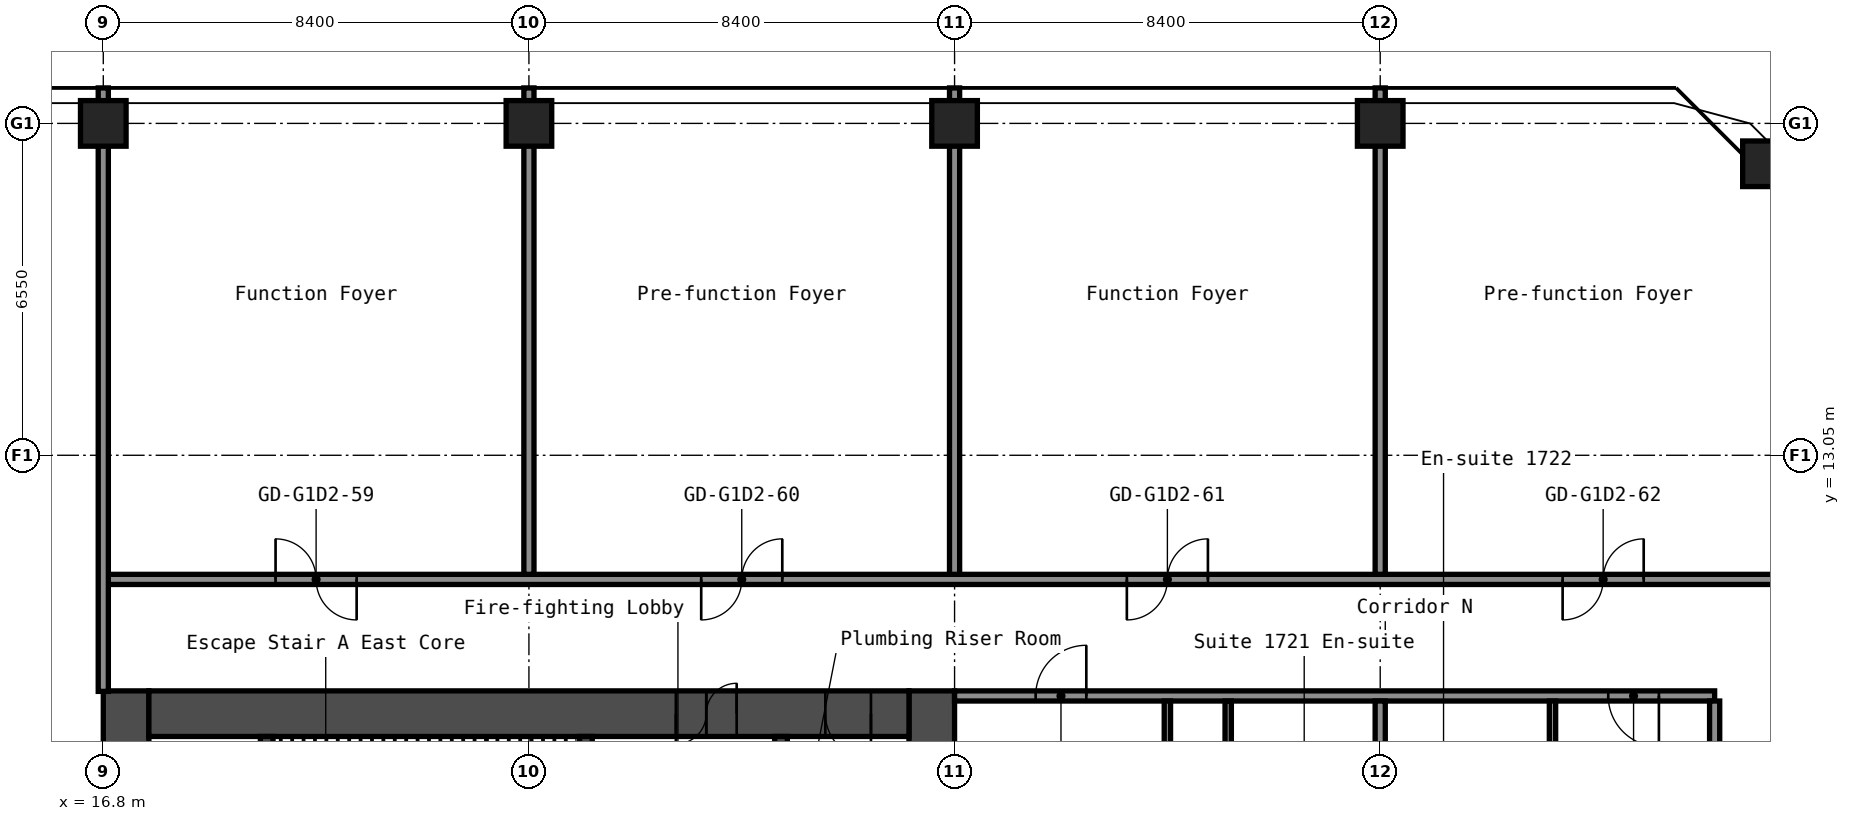
"""IFC4 building model, lengths in metres.
Left out: names, types, materials, properties, quantities, classifications, styles, units other than length and angle.
Written with IfcOpenShell. Run it as: python <this file> out.ifc"""

import sys

from ifc_helpers import new_model, si_unit, direction, frame, frame_2d, origin, origin_2d, place, context, subcontext, project, spatial, rectangle, hollow_rectangle, extrude, element, fill, save


model = new_model("IFC4")
c1 = context("Model", 3, precision=1e-05, world=origin(), true_north=direction((0.0, 1.0)))
c2 = subcontext(c1, "Body", "Model", "MODEL_VIEW")
j1 = project(units=[si_unit("LENGTHUNIT", "METRE"), si_unit("PLANEANGLEUNIT", "RADIAN")], contexts=[c1])
p1 = place(None, origin())
s1 = spatial("IfcSite", under=j1, at=p1, CompositionType="ELEMENT")
p2 = place(p1, origin())
s2 = spatial("IfcBuilding", under=s1, at=p2, CompositionType="ELEMENT")
p3 = place(p2, frame((0.0, 0.0, 61.4)))
s3 = spatial("IfcBuildingStorey", under=s2, at=p3, CompositionType="ELEMENT", Elevation=61.4)
for number, where, z_axis, x_axis in (
    (1, (16.8, 19.6, 0.0), (0.0, 0.0, 1.0), (1.0, 0.0, 0.0)),
    (2, (25.2, 19.6, 0.0), (0.0, 0.0, 1.0), (1.0, 0.0, 0.0)),
    (3, (33.6, 19.6, 0.0), (0.0, 0.0, 1.0), (1.0, 0.0, 0.0)),
    (4, (42.0, 19.6, 0.0), (0.0, 0.0, 1.0), (1.0, 0.0, 0.0)),
    (5, (49.603, 18.803, 0.0), (0.0, 0.0, 1.0), (1.0, 0.0, 0.0)),
):
    element("IfcColumn", number, at=place(p3, frame(where, z_axis=z_axis, x_axis=x_axis)), inside=s3, PredefinedType="COLUMN", context=c2, shape_type="SweptSolid", body=[
        extrude(hollow_rectangle(XDim=0.9, YDim=0.9, WallThickness=0.036, at=origin_2d()), origin(), (0.0, 0.0, 1.0), 2.9),
    ])
p4 = place(p3, frame((17.25, -8.4, 0.0), z_axis=(0.0, 0.0, 1.0), x_axis=(0.0, 1.0, 0.0)))
e6 = element("IfcWall", 6, at=p4, inside=s3, PredefinedType="SHEAR", context=c2, shape_type="SweptSolid", body=[
    extrude(rectangle(XDim=16.8, YDim=0.9, at=frame_2d((8.4, 0.0))), origin(), (0.0, 0.0, 1.0), 2.9),
])
p5 = place(p4, frame((12.75, 0.0, 0.0)))
e7 = element("IfcOpeningElement", 7, at=p5, cuts=e6, PredefinedType="OPENING", context=c2, shape_type="SweptSolid", body=[
    extrude(rectangle(XDim=1.2, YDim=2.1, at=frame_2d((0.6, 1.05))), frame((0.0, 0.46, 0.0), z_axis=(0.0, -1.0, 0.0), x_axis=(1.0, 0.0, 0.0)), (0.0, 0.0, 1.0), 0.92),
])
p6 = place(p4, frame((2.85, 0.0, 0.0)))
e8 = element("IfcOpeningElement", 8, at=p6, cuts=e6, PredefinedType="OPENING", context=c2, shape_type="SweptSolid", body=[
    extrude(rectangle(XDim=1.2, YDim=2.1, at=frame_2d((0.6, 1.05))), frame((0.0, 0.46, 0.0), z_axis=(0.0, -1.0, 0.0), x_axis=(1.0, 0.0, 0.0)), (0.0, 0.0, 1.0), 0.92),
])
p7 = place(p3, frame((33.15, -8.4, 0.0), z_axis=(0.0, 0.0, 1.0), x_axis=(0.0, 1.0, 0.0)))
e9 = element("IfcWall", 9, at=p7, inside=s3, PredefinedType="SHEAR", context=c2, shape_type="SweptSolid", body=[
    extrude(rectangle(XDim=16.8, YDim=0.9, at=frame_2d((8.4, 0.0))), origin(), (0.0, 0.0, 1.0), 2.9),
])
p8 = place(p3, frame((17.7, 7.95, 0.0), z_axis=(0.0, 0.0, 1.0), x_axis=(1.0, 0.0, 0.0)))
e10 = element("IfcWall", 10, at=p8, inside=s3, PredefinedType="SHEAR", context=c2, shape_type="SweptSolid", body=[
    extrude(rectangle(XDim=15.0, YDim=0.9, at=frame_2d((7.5, 0.0))), origin(), (0.0, 0.0, 1.0), 2.9),
])
p9 = place(p8, frame((10.4, 0.0, 0.0)))
e11 = element("IfcOpeningElement", 11, at=p9, cuts=e10, PredefinedType="OPENING", context=c2, shape_type="SweptSolid", body=[
    extrude(rectangle(XDim=1.2, YDim=2.1, at=frame_2d((0.6, 1.05))), frame((0.0, 0.46, 0.0), z_axis=(0.0, -1.0, 0.0), x_axis=(1.0, 0.0, 0.0)), (0.0, 0.0, 1.0), 0.92),
])
p10 = place(p8, frame((13.35, 0.0, 0.0)))
e12 = element("IfcOpeningElement", 12, at=p10, cuts=e10, PredefinedType="OPENING", context=c2, shape_type="SweptSolid", body=[
    extrude(rectangle(XDim=0.9, YDim=2.1, at=frame_2d((0.45, 1.05))), frame((0.0, 0.46, 0.0), z_axis=(0.0, -1.0, 0.0), x_axis=(1.0, 0.0, 0.0)), (0.0, 0.0, 1.0), 0.92),
])
p11 = place(p3, frame((20.025, 1.2, 0.0), z_axis=(0.0, 0.0, 1.0), x_axis=(0.0, 1.0, 0.0)))
e13 = element("IfcWall", 13, at=p11, inside=s3, PredefinedType="SHEAR", context=c2, shape_type="SweptSolid", body=[
    extrude(rectangle(XDim=6.3, YDim=0.25, at=frame_2d((3.15, 0.0))), origin(), (0.0, 0.0, 1.0), 2.9),
])
p12 = place(p3, frame((26.325, 3.75, 0.0), z_axis=(0.0, 0.0, 1.0), x_axis=(0.0, 1.0, 0.0)))
e14 = element("IfcWall", 14, at=p12, inside=s3, PredefinedType="SHEAR", context=c2, shape_type="SweptSolid", body=[
    extrude(rectangle(XDim=3.75, YDim=0.25, at=frame_2d((1.875, 0.0))), origin(), (0.0, 0.0, 1.0), 2.9),
])
p13 = place(p12, frame((1.25, 0.0, 0.0)))
e15 = element("IfcOpeningElement", 15, at=p13, cuts=e14, PredefinedType="OPENING", context=c2, shape_type="SweptSolid", body=[
    extrude(rectangle(XDim=1.2, YDim=2.1, at=frame_2d((0.6, 1.05))), frame((0.0, 0.135, 0.0), z_axis=(0.0, -1.0, 0.0), x_axis=(1.0, 0.0, 0.0)), (0.0, 0.0, 1.0), 0.27),
])
p14 = place(p3, frame((30.175, 1.45, 0.0), z_axis=(0.0, 0.0, 1.0), x_axis=(0.0, 1.0, 0.0)))
e16 = element("IfcWall", 16, at=p14, inside=s3, PredefinedType="SHEAR", context=c2, shape_type="SweptSolid", body=[
    extrude(rectangle(XDim=6.05, YDim=0.25, at=frame_2d((3.025, 0.0))), origin(), (0.0, 0.0, 1.0), 2.9),
])
p15 = place(p14, frame((2.625, 0.0, 0.0)))
e17 = element("IfcOpeningElement", 17, at=p15, cuts=e16, PredefinedType="OPENING", context=c2, shape_type="SweptSolid", body=[
    extrude(rectangle(XDim=1.1, YDim=2.1, at=frame_2d((0.55, 1.05))), frame((0.0, 0.135, 0.0), z_axis=(0.0, -1.0, 0.0), x_axis=(1.0, 0.0, 0.0)), (0.0, 0.0, 1.0), 0.27),
])
p16 = place(p3, frame((33.6, 8.3, 0.0), z_axis=(0.0, 0.0, 1.0), x_axis=(1.0, 0.0, 0.0)))
e18 = element("IfcWall", 18, at=p16, inside=s3, PredefinedType="PARTITIONING", context=c2, shape_type="SweptSolid", body=[
    extrude(rectangle(XDim=15.0, YDim=0.2, at=frame_2d((7.5, 0.0))), origin(), (0.0, 0.0, 1.0), 2.9),
])
p17 = place(p16, frame((1.6, 0.0, 0.0)))
e19 = element("IfcOpeningElement", 19, at=p17, cuts=e18, PredefinedType="OPENING", context=c2, shape_type="SweptSolid", body=[
    extrude(rectangle(XDim=1.0, YDim=2.1, at=frame_2d((0.5, 1.05))), frame((0.0, 0.11, 0.0), z_axis=(0.0, -1.0, 0.0), x_axis=(1.0, 0.0, 0.0)), (0.0, 0.0, 1.0), 0.22),
])
p18 = place(p16, frame((12.9, 0.0, 0.0)))
e20 = element("IfcOpeningElement", 20, at=p18, cuts=e18, PredefinedType="OPENING", context=c2, shape_type="SweptSolid", body=[
    extrude(rectangle(XDim=1.0, YDim=2.1, at=frame_2d((0.5, 1.05))), frame((0.0, 0.11, 0.0), z_axis=(0.0, -1.0, 0.0), x_axis=(1.0, 0.0, 0.0)), (0.0, 0.0, 1.0), 0.22),
])
p19 = place(p3, frame((16.8, 10.6, 0.0), z_axis=(0.0, 0.0, 1.0), x_axis=(1.0, 0.0, 0.0)))
e21 = element("IfcWall", 21, at=p19, inside=s3, PredefinedType="PARTITIONING", context=c2, shape_type="SweptSolid", body=[
    extrude(rectangle(XDim=34.3, YDim=0.2, at=frame_2d((17.15, 0.0))), origin(), (0.0, 0.0, 1.0), 2.9),
])
p20 = place(p19, frame((3.4, 0.0, 0.0)))
e22 = element("IfcOpeningElement", 22, at=p20, cuts=e21, PredefinedType="OPENING", context=c2, shape_type="SweptSolid", body=[
    extrude(rectangle(XDim=1.6, YDim=2.1, at=frame_2d((0.8, 1.05))), frame((0.0, 0.11, 0.0), z_axis=(0.0, -1.0, 0.0), x_axis=(1.0, 0.0, 0.0)), (0.0, 0.0, 1.0), 0.22),
])
p21 = place(p19, frame((11.8, 0.0, 0.0)))
e23 = element("IfcOpeningElement", 23, at=p21, cuts=e21, PredefinedType="OPENING", context=c2, shape_type="SweptSolid", body=[
    extrude(rectangle(XDim=1.6, YDim=2.1, at=frame_2d((0.8, 1.05))), frame((0.0, 0.11, 0.0), z_axis=(0.0, -1.0, 0.0), x_axis=(1.0, 0.0, 0.0)), (0.0, 0.0, 1.0), 0.22),
])
p22 = place(p19, frame((20.2, 0.0, 0.0)))
e24 = element("IfcOpeningElement", 24, at=p22, cuts=e21, PredefinedType="OPENING", context=c2, shape_type="SweptSolid", body=[
    extrude(rectangle(XDim=1.6, YDim=2.1, at=frame_2d((0.8, 1.05))), frame((0.0, 0.11, 0.0), z_axis=(0.0, -1.0, 0.0), x_axis=(1.0, 0.0, 0.0)), (0.0, 0.0, 1.0), 0.22),
])
p23 = place(p19, frame((28.8, 0.0, 0.0)))
e25 = element("IfcOpeningElement", 25, at=p23, cuts=e21, PredefinedType="OPENING", context=c2, shape_type="SweptSolid", body=[
    extrude(rectangle(XDim=1.6, YDim=2.1, at=frame_2d((0.8, 1.05))), frame((0.0, 0.11, 0.0), z_axis=(0.0, -1.0, 0.0), x_axis=(1.0, 0.0, 0.0)), (0.0, 0.0, 1.0), 0.22),
])
p24 = place(p3, frame((16.8, 8.39, 0.0), z_axis=(0.0, 0.0, 1.0), x_axis=(0.0, 1.0, 0.0)))
e26 = element("IfcWall", 26, at=p24, inside=s3, PredefinedType="PARTITIONING", context=c2, shape_type="SweptSolid", body=[
    extrude(rectangle(XDim=11.91, YDim=0.2, at=frame_2d((5.955, 0.0))), origin(), (0.0, 0.0, 1.0), 2.9),
])
for number, where, z_axis, x_axis in (
    (27, (25.2, 10.7, 0.0), (0.0, 0.0, 1.0), (0.0, 1.0, 0.0)),
    (28, (33.6, 10.7, 0.0), (0.0, 0.0, 1.0), (0.0, 1.0, 0.0)),
):
    element("IfcWall", number, at=place(p3, frame(where, z_axis=z_axis, x_axis=x_axis)), inside=s3, PredefinedType="PARTITIONING", context=c2, shape_type="SweptSolid", body=[
        extrude(rectangle(XDim=9.6, YDim=0.2, at=frame_2d((4.8, 0.0))), origin(), (0.0, 0.0, 1.0), 2.9),
    ])
p25 = place(p3, frame((37.8, -8.2, 0.0), z_axis=(0.0, 0.0, 1.0), x_axis=(0.0, 1.0, 0.0)))
e29 = element("IfcWall", 29, at=p25, inside=s3, PredefinedType="PARTITIONING", context=c2, shape_type="SweptSolid", body=[
    extrude(rectangle(XDim=16.4, YDim=0.125, at=frame_2d((8.2, 0.0))), origin(), (0.0, 0.0, 1.0), 2.9),
])
p26 = place(p25, frame((4.05, 0.0, 0.0)))
e30 = element("IfcOpeningElement", 30, at=p26, cuts=e29, PredefinedType="OPENING", context=c2, shape_type="SweptSolid", body=[
    extrude(rectangle(XDim=0.9, YDim=2.1, at=frame_2d((0.45, 1.05))), frame((0.0, 0.073, 0.0), z_axis=(0.0, -1.0, 0.0), x_axis=(1.0, 0.0, 0.0)), (0.0, 0.0, 1.0), 0.145),
])
p27 = place(p25, frame((11.45, 0.0, 0.0)))
e31 = element("IfcOpeningElement", 31, at=p27, cuts=e29, PredefinedType="OPENING", context=c2, shape_type="SweptSolid", body=[
    extrude(rectangle(XDim=0.9, YDim=2.1, at=frame_2d((0.45, 1.05))), frame((0.0, 0.073, 0.0), z_axis=(0.0, -1.0, 0.0), x_axis=(1.0, 0.0, 0.0)), (0.0, 0.0, 1.0), 0.145),
])
p28 = place(p3, frame((39.0, 5.1, 0.0), z_axis=(0.0, 0.0, 1.0), x_axis=(0.0, 1.0, 0.0)))
e32 = element("IfcWall", 32, at=p28, inside=s3, PredefinedType="PARTITIONING", context=c2, shape_type="SweptSolid", body=[
    extrude(rectangle(XDim=3.1, YDim=0.125, at=frame_2d((1.55, 0.0))), origin(), (0.0, 0.0, 1.0), 2.9),
])
p29 = place(p3, frame((42.0, -8.2, 0.0), z_axis=(0.0, 0.0, 1.0), x_axis=(0.0, 1.0, 0.0)))
e33 = element("IfcWall", 33, at=p29, inside=s3, PredefinedType="PARTITIONING", context=c2, shape_type="SweptSolid", body=[
    extrude(rectangle(XDim=16.4, YDim=0.2, at=frame_2d((8.2, 0.0))), origin(), (0.0, 0.0, 1.0), 2.9),
])
p30 = place(p3, frame((42.0, 10.7, 0.0), z_axis=(0.0, 0.0, 1.0), x_axis=(0.0, 1.0, 0.0)))
e34 = element("IfcWall", 34, at=p30, inside=s3, PredefinedType="PARTITIONING", context=c2, shape_type="SweptSolid", body=[
    extrude(rectangle(XDim=9.6, YDim=0.2, at=frame_2d((4.8, 0.0))), origin(), (0.0, 0.0, 1.0), 2.9),
])
p31 = place(p3, frame((45.4, 4.9, 0.0), z_axis=(0.0, 0.0, 1.0), x_axis=(0.0, 1.0, 0.0)))
e35 = element("IfcWall", 35, at=p31, inside=s3, PredefinedType="PARTITIONING", context=c2, shape_type="SweptSolid", body=[
    extrude(rectangle(XDim=3.3, YDim=0.125, at=frame_2d((1.65, 0.0))), origin(), (0.0, 0.0, 1.0), 2.9),
])
p32 = place(p3, frame((48.6, -8.2, 0.0), z_axis=(0.0, 0.0, 1.0), x_axis=(0.0, 1.0, 0.0)))
e36 = element("IfcWall", 36, at=p32, inside=s3, PredefinedType="PARTITIONING", context=c2, shape_type="SweptSolid", body=[
    extrude(rectangle(XDim=16.4, YDim=0.2, at=frame_2d((8.2, 0.0))), origin(), (0.0, 0.0, 1.0), 2.9),
])
p33 = place(p9, origin())
e37 = element("IfcDoor", 37, at=p33, inside=s3, OperationType="DOUBLE_DOOR_SINGLE_SWING", PredefinedType="DOOR", context=c2, shape_type="SweptSolid", body=[
    extrude(rectangle(XDim=1.2, YDim=2.1, at=frame_2d((0.6, 1.05))), frame((0.0, 0.025, 0.0), z_axis=(0.0, -1.0, 0.0), x_axis=(1.0, 0.0, 0.0)), (0.0, 0.0, 1.0), 0.05),
])
fill(e11, e37)
p34 = place(p10, origin())
e38 = element("IfcDoor", 38, at=p34, inside=s3, OperationType="SINGLE_SWING_RIGHT", PredefinedType="DOOR", context=c2, shape_type="SweptSolid", body=[
    extrude(rectangle(XDim=0.9, YDim=2.1, at=frame_2d((0.45, 1.05))), frame((0.0, 0.025, 0.0), z_axis=(0.0, -1.0, 0.0), x_axis=(1.0, 0.0, 0.0)), (0.0, 0.0, 1.0), 0.05),
])
fill(e12, e38)
p35 = place(p17, origin())
e39 = element("IfcDoor", 39, at=p35, inside=s3, OperationType="SINGLE_SWING_LEFT", PredefinedType="DOOR", context=c2, shape_type="SweptSolid", body=[
    extrude(rectangle(XDim=1.0, YDim=2.1, at=frame_2d((0.5, 1.05))), frame((0.0, 0.025, 0.0), z_axis=(0.0, -1.0, 0.0), x_axis=(1.0, 0.0, 0.0)), (0.0, 0.0, 1.0), 0.05),
])
fill(e19, e39)
p36 = place(p18, origin())
e40 = element("IfcDoor", 40, at=p36, inside=s3, OperationType="SINGLE_SWING_RIGHT", PredefinedType="DOOR", context=c2, shape_type="SweptSolid", body=[
    extrude(rectangle(XDim=1.0, YDim=2.1, at=frame_2d((0.5, 1.05))), frame((0.0, 0.025, 0.0), z_axis=(0.0, -1.0, 0.0), x_axis=(1.0, 0.0, 0.0)), (0.0, 0.0, 1.0), 0.05),
])
fill(e20, e40)
p37 = place(p20, origin())
e41 = element("IfcDoor", 41, at=p37, inside=s3, OperationType="DOUBLE_DOOR_SINGLE_SWING", PredefinedType="DOOR", context=c2, shape_type="SweptSolid", body=[
    extrude(rectangle(XDim=1.6, YDim=2.1, at=frame_2d((0.8, 1.05))), frame((0.0, 0.025, 0.0), z_axis=(0.0, -1.0, 0.0), x_axis=(1.0, 0.0, 0.0)), (0.0, 0.0, 1.0), 0.05),
])
fill(e22, e41)
p38 = place(p21, origin())
e42 = element("IfcDoor", 42, at=p38, inside=s3, OperationType="DOUBLE_DOOR_SINGLE_SWING", PredefinedType="DOOR", context=c2, shape_type="SweptSolid", body=[
    extrude(rectangle(XDim=1.6, YDim=2.1, at=frame_2d((0.8, 1.05))), frame((0.0, 0.025, 0.0), z_axis=(0.0, -1.0, 0.0), x_axis=(1.0, 0.0, 0.0)), (0.0, 0.0, 1.0), 0.05),
])
fill(e23, e42)
p39 = place(p22, origin())
e43 = element("IfcDoor", 43, at=p39, inside=s3, OperationType="DOUBLE_DOOR_SINGLE_SWING", PredefinedType="DOOR", context=c2, shape_type="SweptSolid", body=[
    extrude(rectangle(XDim=1.6, YDim=2.1, at=frame_2d((0.8, 1.05))), frame((0.0, 0.025, 0.0), z_axis=(0.0, -1.0, 0.0), x_axis=(1.0, 0.0, 0.0)), (0.0, 0.0, 1.0), 0.05),
])
fill(e24, e43)
p40 = place(p23, origin())
e44 = element("IfcDoor", 44, at=p40, inside=s3, OperationType="DOUBLE_DOOR_SINGLE_SWING", PredefinedType="DOOR", context=c2, shape_type="SweptSolid", body=[
    extrude(rectangle(XDim=1.6, YDim=2.1, at=frame_2d((0.8, 1.05))), frame((0.0, 0.025, 0.0), z_axis=(0.0, -1.0, 0.0), x_axis=(1.0, 0.0, 0.0)), (0.0, 0.0, 1.0), 0.05),
])
fill(e25, e44)
save(model, sys.argv[1])
